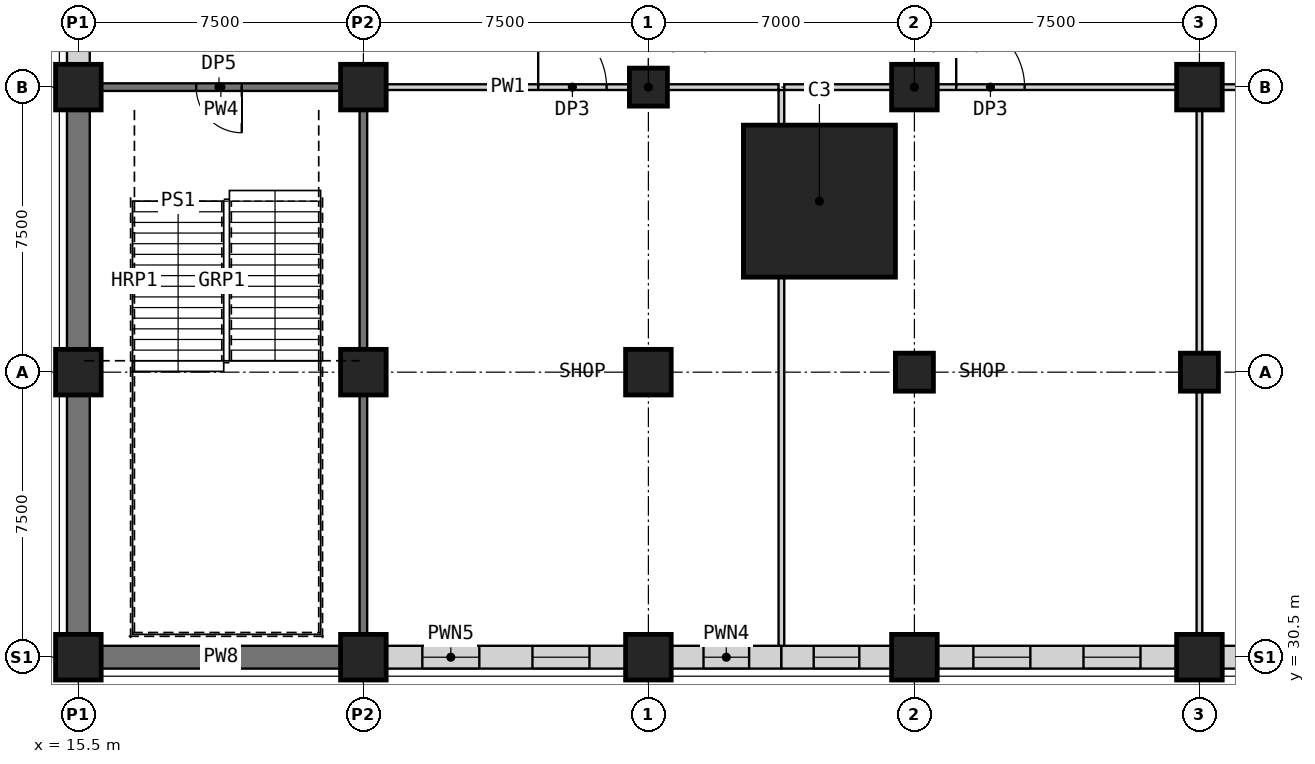
"""IFC4 building model, lengths in metres.
Left out: names, types, materials, properties, quantities, classifications, styles, units other than length and angle.
Written with IfcOpenShell. Run it as: python <this file> out.ifc"""

import sys

from ifc_helpers import new_model, si_unit, direction, frame, frame_2d, origin, origin_2d, place, context, subcontext, project, spatial, rectangle, extrude, element, fill, save


model = new_model("IFC4")
c1 = context("Model", 3, precision=1e-05, world=origin(), true_north=direction((0.0, 1.0)))
c2 = subcontext(c1, "Body", "Model", "MODEL_VIEW")
j1 = project(units=[si_unit("LENGTHUNIT", "METRE"), si_unit("PLANEANGLEUNIT", "RADIAN")], contexts=[c1])
p1 = place(None, origin())
s1 = spatial("IfcSite", under=j1, at=p1, CompositionType="ELEMENT")
p2 = place(p1, origin())
s2 = spatial("IfcBuilding", under=s1, at=p2, CompositionType="ELEMENT")
p3 = place(p2, frame((0.0, 0.0, 8.0)))
s3 = spatial("IfcBuildingStorey", under=s2, at=p3, CompositionType="ELEMENT", Elevation=8.0)
for number, where, z_axis, x_axis in (
    (1, (30.5, 45.5, 0.0), (0.0, 0.0, 1.0), (1.0, 0.0, 0.0)),
    (2, (37.5, 38.0, 0.0), (0.0, 0.0, 1.0), (1.0, 0.0, 0.0)),
):
    element("IfcColumn", number, at=place(p3, frame(where, z_axis=z_axis, x_axis=x_axis)), inside=s3, PredefinedType="COLUMN", context=c2, shape_type="SweptSolid", body=[
        extrude(rectangle(XDim=1.0, YDim=1.0, at=origin_2d()), origin(), (0.0, 0.0, 1.0), 5.5),
    ])
p4 = place(p3, frame((37.5, 45.5, 0.0), z_axis=(0.0, 0.0, 1.0), x_axis=(1.0, 0.0, 0.0)))
e3 = element("IfcColumn", 3, at=p4, inside=s3, PredefinedType="COLUMN", context=c2, shape_type="SweptSolid", body=[
    extrude(rectangle(XDim=1.2, YDim=1.2, at=origin_2d()), origin(), (0.0, 0.0, 1.0), 5.5),
])
p5 = place(p3, frame((45.0, 38.0, 0.0), z_axis=(0.0, 0.0, 1.0), x_axis=(1.0, 0.0, 0.0)))
e4 = element("IfcColumn", 4, at=p5, inside=s3, PredefinedType="COLUMN", context=c2, shape_type="SweptSolid", body=[
    extrude(rectangle(XDim=1.0, YDim=1.0, at=origin_2d()), origin(), (0.0, 0.0, 1.0), 5.5),
])
p6 = place(p3, frame((45.0, 45.5, 0.0), z_axis=(0.0, 0.0, 1.0), x_axis=(1.0, 0.0, 0.0)))
e5 = element("IfcColumn", 5, at=p6, inside=s3, PredefinedType="COLUMN", context=c2, shape_type="SweptSolid", body=[
    extrude(rectangle(XDim=1.2, YDim=1.2, at=origin_2d()), origin(), (0.0, 0.0, 1.0), 5.5),
])
p7 = place(p3, frame((35.0, 42.5, 0.0), z_axis=(0.0, 0.0, 1.0), x_axis=(1.0, 0.0, 0.0)))
e6 = element("IfcColumn", 6, at=p7, inside=s3, PredefinedType="COLUMN", context=c2, shape_type="SweptSolid", body=[
    extrude(rectangle(XDim=4.0, YDim=4.0, at=origin_2d()), origin(), (0.0, 0.0, 1.0), 5.5),
])
for number, where, z_axis, x_axis in (
    (7, (15.5, 30.5, 0.0), (0.0, 0.0, 1.0), (1.0, 0.0, 0.0)),
    (8, (15.5, 38.0, 0.0), (0.0, 0.0, 1.0), (1.0, 0.0, 0.0)),
    (9, (15.5, 45.5, 0.0), (0.0, 0.0, 1.0), (1.0, 0.0, 0.0)),
    (10, (23.0, 30.5, 0.0), (0.0, 0.0, 1.0), (1.0, 0.0, 0.0)),
    (11, (23.0, 38.0, 0.0), (0.0, 0.0, 1.0), (1.0, 0.0, 0.0)),
    (12, (23.0, 45.5, 0.0), (0.0, 0.0, 1.0), (1.0, 0.0, 0.0)),
    (13, (30.5, 30.5, 0.0), (0.0, 0.0, 1.0), (1.0, 0.0, 0.0)),
    (14, (30.5, 38.0, 0.0), (0.0, 0.0, 1.0), (1.0, 0.0, 0.0)),
    (15, (37.5, 30.5, 0.0), (0.0, 0.0, 1.0), (1.0, 0.0, 0.0)),
    (16, (45.0, 30.5, 0.0), (0.0, 0.0, 1.0), (1.0, 0.0, 0.0)),
):
    element("IfcColumn", number, at=place(p3, frame(where, z_axis=z_axis, x_axis=x_axis)), inside=s3, PredefinedType="COLUMN", context=c2, shape_type="SweptSolid", body=[
        extrude(rectangle(XDim=1.2, YDim=1.2, at=origin_2d()), origin(), (0.0, 0.0, 1.0), 5.5),
    ])
p8 = place(p3, frame((16.1, 30.5, 0.0), z_axis=(0.0, 0.0, 1.0), x_axis=(1.0, 0.0, 0.0)))
e17 = element("IfcWall", 17, at=p8, inside=s3, PredefinedType="PARTITIONING", context=c2, shape_type="SweptSolid", body=[
    extrude(rectangle(XDim=6.3, YDim=0.6, at=frame_2d((3.15, 0.0))), origin(), (0.0, 0.0, 1.0), 4.6),
])
p9 = place(p3, frame((23.6, 30.5, 0.0), z_axis=(0.0, 0.0, 1.0), x_axis=(1.0, 0.0, 0.0)))
e18 = element("IfcWall", 18, at=p9, inside=s3, PredefinedType="PARTITIONING", context=c2, shape_type="SweptSolid", body=[
    extrude(rectangle(XDim=6.3, YDim=0.6, at=frame_2d((3.15, 0.0))), origin(), (0.0, 0.0, 1.0), 4.6),
])
p10 = place(p9, frame((0.951, 0.0, 0.9)))
e19 = element("IfcOpeningElement", 19, at=p10, cuts=e18, PredefinedType="OPENING", context=c2, shape_type="SweptSolid", body=[
    extrude(rectangle(XDim=1.5, YDim=2.8, at=frame_2d((0.75, 1.4))), frame((0.0, 0.31, 0.0), z_axis=(0.0, -1.0, 0.0), x_axis=(1.0, 0.0, 0.0)), (0.0, 0.0, 1.0), 0.62),
])
p11 = place(p9, frame((3.849, 0.0, 0.9)))
e20 = element("IfcOpeningElement", 20, at=p11, cuts=e18, PredefinedType="OPENING", context=c2, shape_type="SweptSolid", body=[
    extrude(rectangle(XDim=1.5, YDim=2.8, at=frame_2d((0.75, 1.4))), frame((0.0, 0.31, 0.0), z_axis=(0.0, -1.0, 0.0), x_axis=(1.0, 0.0, 0.0)), (0.0, 0.0, 1.0), 0.62),
])
p12 = place(p3, frame((31.1, 30.5, 0.0), z_axis=(0.0, 0.0, 1.0), x_axis=(1.0, 0.0, 0.0)))
e21 = element("IfcWall", 21, at=p12, inside=s3, PredefinedType="PARTITIONING", context=c2, shape_type="SweptSolid", body=[
    extrude(rectangle(XDim=2.9, YDim=0.6, at=frame_2d((1.45, 0.0))), origin(), (0.0, 0.0, 1.0), 4.6),
])
p13 = place(p12, frame((0.85, 0.0, 0.9)))
e22 = element("IfcOpeningElement", 22, at=p13, cuts=e21, PredefinedType="OPENING", context=c2, shape_type="SweptSolid", body=[
    extrude(rectangle(XDim=1.2, YDim=2.8, at=frame_2d((0.6, 1.4))), frame((0.0, 0.31, 0.0), z_axis=(0.0, -1.0, 0.0), x_axis=(1.0, 0.0, 0.0)), (0.0, 0.0, 1.0), 0.62),
])
p14 = place(p3, frame((34.0, 30.5, 0.0), z_axis=(0.0, 0.0, 1.0), x_axis=(1.0, 0.0, 0.0)))
e23 = element("IfcWall", 23, at=p14, inside=s3, PredefinedType="PARTITIONING", context=c2, shape_type="SweptSolid", body=[
    extrude(rectangle(XDim=2.9, YDim=0.6, at=frame_2d((1.45, 0.0))), origin(), (0.0, 0.0, 1.0), 4.6),
])
p15 = place(p14, frame((0.85, 0.0, 0.9)))
e24 = element("IfcOpeningElement", 24, at=p15, cuts=e23, PredefinedType="OPENING", context=c2, shape_type="SweptSolid", body=[
    extrude(rectangle(XDim=1.2, YDim=2.8, at=frame_2d((0.6, 1.4))), frame((0.0, 0.31, 0.0), z_axis=(0.0, -1.0, 0.0), x_axis=(1.0, 0.0, 0.0)), (0.0, 0.0, 1.0), 0.62),
])
p16 = place(p3, frame((38.1, 30.5, 0.0), z_axis=(0.0, 0.0, 1.0), x_axis=(1.0, 0.0, 0.0)))
e25 = element("IfcWall", 25, at=p16, inside=s3, PredefinedType="PARTITIONING", context=c2, shape_type="SweptSolid", body=[
    extrude(rectangle(XDim=6.3, YDim=0.6, at=frame_2d((3.15, 0.0))), origin(), (0.0, 0.0, 1.0), 4.6),
])
p17 = place(p16, frame((0.951, 0.0, 0.9)))
e26 = element("IfcOpeningElement", 26, at=p17, cuts=e25, PredefinedType="OPENING", context=c2, shape_type="SweptSolid", body=[
    extrude(rectangle(XDim=1.5, YDim=2.8, at=frame_2d((0.75, 1.4))), frame((0.0, 0.31, 0.0), z_axis=(0.0, -1.0, 0.0), x_axis=(1.0, 0.0, 0.0)), (0.0, 0.0, 1.0), 0.62),
])
p18 = place(p16, frame((3.849, 0.0, 0.9)))
e27 = element("IfcOpeningElement", 27, at=p18, cuts=e25, PredefinedType="OPENING", context=c2, shape_type="SweptSolid", body=[
    extrude(rectangle(XDim=1.5, YDim=2.8, at=frame_2d((0.75, 1.4))), frame((0.0, 0.31, 0.0), z_axis=(0.0, -1.0, 0.0), x_axis=(1.0, 0.0, 0.0)), (0.0, 0.0, 1.0), 0.62),
])
p19 = place(p3, frame((45.6, 30.5, 0.0), z_axis=(0.0, 0.0, 1.0), x_axis=(1.0, 0.0, 0.0)))
e28 = element("IfcWall", 28, at=p19, inside=s3, PredefinedType="PARTITIONING", context=c2, shape_type="SweptSolid", body=[
    extrude(rectangle(XDim=6.3, YDim=0.6, at=frame_2d((3.15, 0.0))), origin(), (0.0, 0.0, 1.0), 4.6),
])
p20 = place(p19, frame((0.951, 0.0, 0.9)))
e29 = element("IfcOpeningElement", 29, at=p20, cuts=e28, PredefinedType="OPENING", context=c2, shape_type="SweptSolid", body=[
    extrude(rectangle(XDim=1.5, YDim=2.8, at=frame_2d((0.75, 1.4))), frame((0.0, 0.31, 0.0), z_axis=(0.0, -1.0, 0.0), x_axis=(1.0, 0.0, 0.0)), (0.0, 0.0, 1.0), 0.62),
])
p21 = place(p19, frame((3.849, 0.0, 0.9)))
e30 = element("IfcOpeningElement", 30, at=p21, cuts=e28, PredefinedType="OPENING", context=c2, shape_type="SweptSolid", body=[
    extrude(rectangle(XDim=1.5, YDim=2.8, at=frame_2d((0.75, 1.4))), frame((0.0, 0.31, 0.0), z_axis=(0.0, -1.0, 0.0), x_axis=(1.0, 0.0, 0.0)), (0.0, 0.0, 1.0), 0.62),
])
p22 = place(p3, frame((22.4, 45.5, 0.0), z_axis=(0.0, 0.0, 1.0), x_axis=(-1.0, 0.0, 0.0)))
e31 = element("IfcWall", 31, at=p22, inside=s3, PredefinedType="SHEAR", context=c2, shape_type="SweptSolid", body=[
    extrude(rectangle(XDim=6.3, YDim=0.2, at=frame_2d((3.15, 0.0))), origin(), (0.0, 0.0, 1.0), 5.2),
])
p23 = place(p22, frame((2.6, 0.0, 0.0)))
e32 = element("IfcOpeningElement", 32, at=p23, cuts=e31, PredefinedType="OPENING", context=c2, shape_type="SweptSolid", body=[
    extrude(rectangle(XDim=1.2, YDim=2.1, at=frame_2d((0.6, 1.05))), frame((0.0, 0.11, 0.0), z_axis=(0.0, -1.0, 0.0), x_axis=(1.0, 0.0, 0.0)), (0.0, 0.0, 1.0), 0.22),
])
p24 = place(p3, frame((23.6, 45.5, 0.0), z_axis=(0.0, 0.0, 1.0), x_axis=(1.0, 0.0, 0.0)))
e33 = element("IfcWall", 33, at=p24, inside=s3, PredefinedType="PARTITIONING", context=c2, shape_type="SweptSolid", body=[
    extrude(rectangle(XDim=6.4, YDim=0.15, at=frame_2d((3.2, 0.0))), origin(), (0.0, 0.0, 1.0), 5.2),
])
p25 = place(p24, frame((4.0, 0.0, 0.0)))
e34 = element("IfcOpeningElement", 34, at=p25, cuts=e33, PredefinedType="OPENING", context=c2, shape_type="SweptSolid", body=[
    extrude(rectangle(XDim=1.8, YDim=2.4, at=frame_2d((0.9, 1.2))), frame((0.0, 0.085, 0.0), z_axis=(0.0, -1.0, 0.0), x_axis=(1.0, 0.0, 0.0)), (0.0, 0.0, 1.0), 0.17),
])
p26 = place(p3, frame((31.0, 45.5, 0.0), z_axis=(0.0, 0.0, 1.0), x_axis=(1.0, 0.0, 0.0)))
e35 = element("IfcWall", 35, at=p26, inside=s3, PredefinedType="PARTITIONING", context=c2, shape_type="SweptSolid", body=[
    extrude(rectangle(XDim=2.925, YDim=0.15, at=frame_2d((1.462, 0.0))), origin(), (0.0, 0.0, 1.0), 5.2),
])
p27 = place(p3, frame((34.075, 45.5, 0.0), z_axis=(0.0, 0.0, 1.0), x_axis=(1.0, 0.0, 0.0)))
e36 = element("IfcWall", 36, at=p27, inside=s3, PredefinedType="PARTITIONING", context=c2, shape_type="SweptSolid", body=[
    extrude(rectangle(XDim=2.825, YDim=0.15, at=frame_2d((1.413, 0.0))), origin(), (0.0, 0.0, 1.0), 5.2),
])
p28 = place(p3, frame((38.1, 45.5, 0.0), z_axis=(0.0, 0.0, 1.0), x_axis=(1.0, 0.0, 0.0)))
e37 = element("IfcWall", 37, at=p28, inside=s3, PredefinedType="PARTITIONING", context=c2, shape_type="SweptSolid", body=[
    extrude(rectangle(XDim=6.3, YDim=0.15, at=frame_2d((3.15, 0.0))), origin(), (0.0, 0.0, 1.0), 5.2),
])
p29 = place(p28, frame((0.5, 0.0, 0.0)))
e38 = element("IfcOpeningElement", 38, at=p29, cuts=e37, PredefinedType="OPENING", context=c2, shape_type="SweptSolid", body=[
    extrude(rectangle(XDim=1.8, YDim=2.4, at=frame_2d((0.9, 1.2))), frame((0.0, 0.085, 0.0), z_axis=(0.0, -1.0, 0.0), x_axis=(1.0, 0.0, 0.0)), (0.0, 0.0, 1.0), 0.17),
])
p30 = place(p3, frame((45.6, 45.5, 0.0), z_axis=(0.0, 0.0, 1.0), x_axis=(1.0, 0.0, 0.0)))
e39 = element("IfcWall", 39, at=p30, inside=s3, PredefinedType="PARTITIONING", context=c2, shape_type="SweptSolid", body=[
    extrude(rectangle(XDim=6.3, YDim=0.15, at=frame_2d((3.15, 0.0))), origin(), (0.0, 0.0, 1.0), 5.2),
])
p31 = place(p30, frame((2.25, 0.0, 0.0)))
e40 = element("IfcOpeningElement", 40, at=p31, cuts=e39, PredefinedType="OPENING", context=c2, shape_type="SweptSolid", body=[
    extrude(rectangle(XDim=1.8, YDim=2.4, at=frame_2d((0.9, 1.2))), frame((0.0, 0.085, 0.0), z_axis=(0.0, -1.0, 0.0), x_axis=(1.0, 0.0, 0.0)), (0.0, 0.0, 1.0), 0.17),
])
for number, where, z_axis, x_axis in (
    (41, (15.5, 31.1, 0.0), (0.0, 0.0, 1.0), (0.0, 1.0, 0.0)),
    (42, (15.5, 38.6, 0.0), (0.0, 0.0, 1.0), (0.0, 1.0, 0.0)),
):
    element("IfcWall", number, at=place(p3, frame(where, z_axis=z_axis, x_axis=x_axis)), inside=s3, PredefinedType="PARTITIONING", context=c2, shape_type="SweptSolid", body=[
        extrude(rectangle(XDim=6.3, YDim=0.6, at=frame_2d((3.15, 0.0))), origin(), (0.0, 0.0, 1.0), 4.6),
    ])
p32 = place(p3, frame((15.5, 46.1, 0.0), z_axis=(0.0, 0.0, 1.0), x_axis=(0.0, 1.0, 0.0)))
e43 = element("IfcWall", 43, at=p32, inside=s3, PredefinedType="PARTITIONING", context=c2, shape_type="SweptSolid", body=[
    extrude(rectangle(XDim=5.8, YDim=0.6, at=frame_2d((2.9, 0.0))), origin(), (0.0, 0.0, 1.0), 4.6),
])
p33 = place(p32, frame((0.816, 0.0, 0.9)))
e44 = element("IfcOpeningElement", 44, at=p33, cuts=e43, PredefinedType="OPENING", context=c2, shape_type="SweptSolid", body=[
    extrude(rectangle(XDim=1.5, YDim=2.8, at=frame_2d((0.75, 1.4))), frame((0.0, 0.31, 0.0), z_axis=(0.0, -1.0, 0.0), x_axis=(1.0, 0.0, 0.0)), (0.0, 0.0, 1.0), 0.62),
])
p34 = place(p32, frame((3.484, 0.0, 0.9)))
e45 = element("IfcOpeningElement", 45, at=p34, cuts=e43, PredefinedType="OPENING", context=c2, shape_type="SweptSolid", body=[
    extrude(rectangle(XDim=1.5, YDim=2.8, at=frame_2d((0.75, 1.4))), frame((0.0, 0.31, 0.0), z_axis=(0.0, -1.0, 0.0), x_axis=(1.0, 0.0, 0.0)), (0.0, 0.0, 1.0), 0.62),
])
for number, where, z_axis, x_axis in (
    (46, (23.0, 31.1, 0.0), (0.0, 0.0, 1.0), (0.0, 1.0, 0.0)),
    (47, (23.0, 38.6, 0.0), (0.0, 0.0, 1.0), (0.0, 1.0, 0.0)),
):
    element("IfcWall", number, at=place(p3, frame(where, z_axis=z_axis, x_axis=x_axis)), inside=s3, PredefinedType="SHEAR", context=c2, shape_type="SweptSolid", body=[
        extrude(rectangle(XDim=6.3, YDim=0.2, at=frame_2d((3.15, 0.0))), origin(), (0.0, 0.0, 1.0), 5.2),
    ])
p35 = place(p3, frame((34.0, 30.8, 0.0), z_axis=(0.0, 0.0, 1.0), x_axis=(0.0, 1.0, 0.0)))
e48 = element("IfcWall", 48, at=p35, inside=s3, PredefinedType="PARTITIONING", context=c2, shape_type="SweptSolid", body=[
    extrude(rectangle(XDim=9.7, YDim=0.15, at=frame_2d((4.85, 0.0))), origin(), (0.0, 0.0, 1.0), 5.2),
])
p36 = place(p3, frame((34.0, 44.5, 0.0), z_axis=(0.0, 0.0, 1.0), x_axis=(0.0, 1.0, 0.0)))
e49 = element("IfcWall", 49, at=p36, inside=s3, PredefinedType="PARTITIONING", context=c2, shape_type="SweptSolid", body=[
    extrude(rectangle(XDim=0.925, YDim=0.15, at=frame_2d((0.462, 0.0))), origin(), (0.0, 0.0, 1.0), 5.2),
])
for number, where, z_axis, x_axis in (
    (50, (45.0, 31.1, 0.0), (0.0, 0.0, 1.0), (0.0, 1.0, 0.0)),
    (51, (45.0, 38.5, 0.0), (0.0, 0.0, 1.0), (0.0, 1.0, 0.0)),
):
    element("IfcWall", number, at=place(p3, frame(where, z_axis=z_axis, x_axis=x_axis)), inside=s3, PredefinedType="PARTITIONING", context=c2, shape_type="SweptSolid", body=[
        extrude(rectangle(XDim=6.4, YDim=0.15, at=frame_2d((3.2, 0.0))), origin(), (0.0, 0.0, 1.0), 5.2),
    ])
p37 = place(p10, origin())
e52 = element("IfcWindow", 52, at=p37, inside=s3, PartitioningType="SINGLE_PANEL", PredefinedType="WINDOW", context=c2, shape_type="SweptSolid", body=[
    extrude(rectangle(XDim=1.5, YDim=2.8, at=frame_2d((0.75, 1.4))), frame((0.0, 0.03, 0.0), z_axis=(0.0, -1.0, 0.0), x_axis=(1.0, 0.0, 0.0)), (0.0, 0.0, 1.0), 0.06),
])
fill(e19, e52)
p38 = place(p11, origin())
e53 = element("IfcWindow", 53, at=p38, inside=s3, PartitioningType="SINGLE_PANEL", PredefinedType="WINDOW", context=c2, shape_type="SweptSolid", body=[
    extrude(rectangle(XDim=1.5, YDim=2.8, at=frame_2d((0.75, 1.4))), frame((0.0, 0.03, 0.0), z_axis=(0.0, -1.0, 0.0), x_axis=(1.0, 0.0, 0.0)), (0.0, 0.0, 1.0), 0.06),
])
fill(e20, e53)
p39 = place(p13, origin())
e54 = element("IfcWindow", 54, at=p39, inside=s3, PartitioningType="SINGLE_PANEL", PredefinedType="WINDOW", context=c2, shape_type="SweptSolid", body=[
    extrude(rectangle(XDim=1.2, YDim=2.8, at=frame_2d((0.6, 1.4))), frame((0.0, 0.03, 0.0), z_axis=(0.0, -1.0, 0.0), x_axis=(1.0, 0.0, 0.0)), (0.0, 0.0, 1.0), 0.06),
])
fill(e22, e54)
p40 = place(p15, origin())
e55 = element("IfcWindow", 55, at=p40, inside=s3, PartitioningType="SINGLE_PANEL", PredefinedType="WINDOW", context=c2, shape_type="SweptSolid", body=[
    extrude(rectangle(XDim=1.2, YDim=2.8, at=frame_2d((0.6, 1.4))), frame((0.0, 0.03, 0.0), z_axis=(0.0, -1.0, 0.0), x_axis=(1.0, 0.0, 0.0)), (0.0, 0.0, 1.0), 0.06),
])
fill(e24, e55)
p41 = place(p17, origin())
e56 = element("IfcWindow", 56, at=p41, inside=s3, PartitioningType="SINGLE_PANEL", PredefinedType="WINDOW", context=c2, shape_type="SweptSolid", body=[
    extrude(rectangle(XDim=1.5, YDim=2.8, at=frame_2d((0.75, 1.4))), frame((0.0, 0.03, 0.0), z_axis=(0.0, -1.0, 0.0), x_axis=(1.0, 0.0, 0.0)), (0.0, 0.0, 1.0), 0.06),
])
fill(e26, e56)
p42 = place(p18, origin())
e57 = element("IfcWindow", 57, at=p42, inside=s3, PartitioningType="SINGLE_PANEL", PredefinedType="WINDOW", context=c2, shape_type="SweptSolid", body=[
    extrude(rectangle(XDim=1.5, YDim=2.8, at=frame_2d((0.75, 1.4))), frame((0.0, 0.03, 0.0), z_axis=(0.0, -1.0, 0.0), x_axis=(1.0, 0.0, 0.0)), (0.0, 0.0, 1.0), 0.06),
])
fill(e27, e57)
p43 = place(p23, origin())
e58 = element("IfcDoor", 58, at=p43, inside=s3, OperationType="SINGLE_SWING_LEFT", PredefinedType="DOOR", context=c2, shape_type="SweptSolid", body=[
    extrude(rectangle(XDim=1.2, YDim=2.1, at=frame_2d((0.6, 1.05))), frame((0.0, 0.025, 0.0), z_axis=(0.0, -1.0, 0.0), x_axis=(1.0, 0.0, 0.0)), (0.0, 0.0, 1.0), 0.05),
])
fill(e32, e58)
p44 = place(p25, origin())
e59 = element("IfcDoor", 59, at=p44, inside=s3, OperationType="SINGLE_SWING_LEFT", PredefinedType="DOOR", context=c2, shape_type="SweptSolid", body=[
    extrude(rectangle(XDim=1.8, YDim=2.4, at=frame_2d((0.9, 1.2))), frame((0.0, 0.025, 0.0), z_axis=(0.0, -1.0, 0.0), x_axis=(1.0, 0.0, 0.0)), (0.0, 0.0, 1.0), 0.05),
])
fill(e34, e59)
p45 = place(p29, origin())
e60 = element("IfcDoor", 60, at=p45, inside=s3, OperationType="SINGLE_SWING_LEFT", PredefinedType="DOOR", context=c2, shape_type="SweptSolid", body=[
    extrude(rectangle(XDim=1.8, YDim=2.4, at=frame_2d((0.9, 1.2))), frame((0.0, 0.025, 0.0), z_axis=(0.0, -1.0, 0.0), x_axis=(1.0, 0.0, 0.0)), (0.0, 0.0, 1.0), 0.05),
])
fill(e38, e60)
save(model, sys.argv[1])
